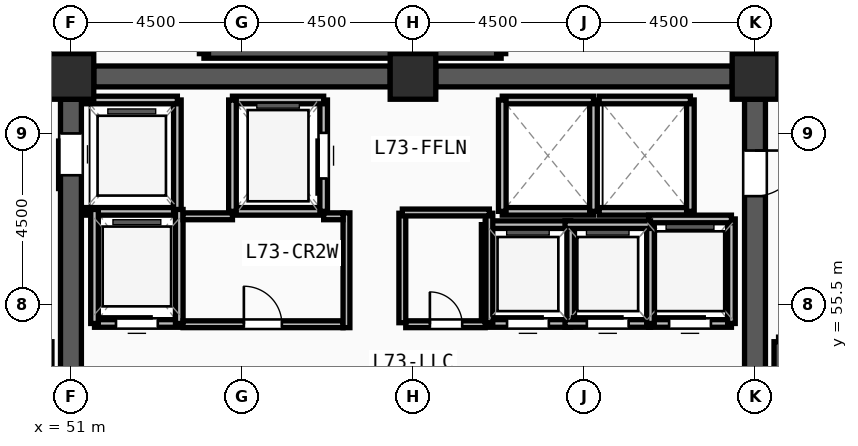
"""IFC4 building model, lengths in metres.
Left out: names, types, materials, properties, quantities, classifications, styles, units other than length and angle.
Written with IfcOpenShell. Run it as: python <this file> out.ifc"""

import sys

from ifc_helpers import new_model, si_unit, direction, frame, frame_2d, origin, origin_2d, place, context, subcontext, project, spatial, rectangle, extrude, source, transform, mapped, element, fill, save


model = new_model("IFC4")
c1 = context("Model", 3, precision=1e-05, world=origin(), true_north=direction((0.0, 1.0)))
c2 = subcontext(c1, "Body", "Model", "MODEL_VIEW")
j1 = project(units=[si_unit("LENGTHUNIT", "METRE"), si_unit("PLANEANGLEUNIT", "RADIAN")], contexts=[c1])
p1 = place(None, origin())
s1 = spatial("IfcSite", under=j1, at=p1, CompositionType="ELEMENT")
p2 = place(p1, origin())
s2 = spatial("IfcBuilding", under=s1, at=p2, CompositionType="ELEMENT")
p3 = place(p2, frame((0.0, 0.0, 282.0)))
s3 = spatial("IfcBuildingStorey", under=s2, at=p3, CompositionType="ELEMENT", Elevation=282.0)
m1 = source(origin(), c2, "Body", "SweptSolid", [
    extrude(rectangle(XDim=1.2, YDim=1.2, at=origin_2d()), origin(), (0.0, 0.0, 1.0), 4.5),
])
for number, where, z_axis, x_axis in (
    (1, (69.0, 61.5, 0.0), (0.0, 0.0, 1.0), (1.0, 0.0, 0.0)),
    (2, (60.0, 61.5, 0.0), (0.0, 0.0, 1.0), (1.0, 0.0, 0.0)),
    (3, (51.0, 61.5, 0.0), (0.0, 0.0, 1.0), (1.0, 0.0, 0.0)),
):
    element("IfcColumn", number, at=place(p3, frame(where, z_axis=z_axis, x_axis=x_axis)), inside=s3, PredefinedType="COLUMN", context=c2, shape_type="MappedRepresentation", body=[
        mapped(m1, transform((0.0, 0.0, 0.0), x_axis=(1.0, 0.0, 0.0), y_axis=(0.0, 1.0, 0.0), z_axis=(0.0, 0.0, 1.0), scale=1.0)),
    ])
for number, where, z_axis, x_axis in (
    (4, (51.6, 61.5, 0.0), (0.0, 0.0, 1.0), (1.0, 0.0, 0.0)),
    (5, (60.6, 61.5, 0.0), (0.0, 0.0, 1.0), (1.0, 0.0, 0.0)),
):
    element("IfcWall", number, at=place(p3, frame(where, z_axis=z_axis, x_axis=x_axis)), inside=s3, PredefinedType="SHEAR", context=c2, shape_type="SweptSolid", body=[
        extrude(rectangle(XDim=7.8, YDim=0.55, at=frame_2d((3.9, 0.0))), origin(), (0.0, 0.0, 1.0), 4.32),
    ])
p4 = place(p3, frame((69.0, 60.9, 0.0), z_axis=(0.0, 0.0, 1.0), x_axis=(0.0, -1.0, 0.0)))
e6 = element("IfcWall", 6, at=p4, inside=s3, PredefinedType="SHEAR", context=c2, shape_type="SweptSolid", body=[
    extrude(rectangle(XDim=13.8, YDim=0.55, at=frame_2d((6.9, 0.0))), origin(), (0.0, 0.0, 1.0), 4.32),
])
m2 = source(origin(), c2, "Body", "SweptSolid", [
    extrude(rectangle(XDim=1.2, YDim=2.2, at=frame_2d((0.6, 1.1))), frame((0.0, 0.285, 0.0), z_axis=(0.0, -1.0, 0.0), x_axis=(1.0, 0.0, 0.0)), (0.0, 0.0, 1.0), 0.57),
])
p5 = place(p4, frame((1.35, 0.0, 0.0)))
e7 = element("IfcOpeningElement", 7, at=p5, cuts=e6, PredefinedType="OPENING", context=c2, shape_type="MappedRepresentation", body=[
    mapped(m2, transform((0.0, 0.0, 0.0), x_axis=(1.0, 0.0, 0.0), y_axis=(0.0, 1.0, 0.0), z_axis=(0.0, 0.0, 1.0), scale=1.0)),
])
p6 = place(p3, frame((51.0, 47.1, 0.0), z_axis=(0.0, 0.0, 1.0), x_axis=(0.0, 1.0, 0.0)))
e8 = element("IfcWall", 8, at=p6, inside=s3, PredefinedType="SHEAR", context=c2, shape_type="SweptSolid", body=[
    extrude(rectangle(XDim=13.8, YDim=0.55, at=frame_2d((6.9, 0.0))), origin(), (0.0, 0.0, 1.0), 4.32),
])
m3 = source(origin(), c2, "Body", "SweptSolid", [
    extrude(rectangle(XDim=1.1, YDim=2.2, at=frame_2d((0.55, 1.1))), frame((0.0, 0.285, 0.0), z_axis=(0.0, -1.0, 0.0), x_axis=(1.0, 0.0, 0.0)), (0.0, 0.0, 1.0), 0.57),
])
p7 = place(p6, frame((11.8, 0.0, 0.0)))
e9 = element("IfcOpeningElement", 9, at=p7, cuts=e8, PredefinedType="OPENING", context=c2, shape_type="MappedRepresentation", body=[
    mapped(m3, transform((0.0, 0.0, 0.0), x_axis=(1.0, 0.0, 0.0), y_axis=(0.0, 1.0, 0.0), z_axis=(0.0, 0.0, 1.0), scale=1.0)),
])
for number, where, z_axis, x_axis in (
    (10, (69.62, 54.52, 0.0), (0.0, 0.0, 1.0), (0.0, -1.0, 0.0)),
    (11, (54.5, 62.1, 0.0), (0.0, 0.0, 1.0), (1.0, 0.0, 0.0)),
):
    element("IfcWall", number, at=place(p3, frame(where, z_axis=z_axis, x_axis=x_axis)), inside=s3, PredefinedType="SOLIDWALL", context=c2, shape_type="SweptSolid", body=[
        extrude(rectangle(XDim=7.82, YDim=0.24, at=frame_2d((3.91, 0.0))), origin(), (0.0, 0.0, 1.0), 4.32),
    ])
for number, where, z_axis, x_axis in (
    (12, (62.32, 62.1, 0.0), (0.0, 0.0, 1.0), (0.0, 1.0, 0.0)),
    (13, (54.5, 65.54, 0.0), (0.0, 0.0, 1.0), (0.0, -1.0, 0.0)),
):
    element("IfcWall", number, at=place(p3, frame(where, z_axis=z_axis, x_axis=x_axis)), inside=s3, PredefinedType="SOLIDWALL", context=c2, shape_type="SweptSolid", body=[
        extrude(rectangle(XDim=3.44, YDim=0.24, at=frame_2d((1.72, 0.0))), origin(), (0.0, 0.0, 1.0), 4.32),
    ])
p8 = place(p3, frame((55.25, 57.95, 0.0), z_axis=(0.0, 0.0, 1.0), x_axis=(1.0, 0.0, 0.0)))
e14 = element("IfcWall", 14, at=p8, inside=s3, PredefinedType="SOLIDWALL", context=c2, shape_type="SweptSolid", body=[
    extrude(rectangle(XDim=2.4, YDim=0.2, at=frame_2d((1.2, 0.0))), origin(), (0.0, 0.0, 1.0), 4.32),
])
p9 = place(p3, frame((57.65, 57.95, 0.0), z_axis=(0.0, 0.0, 1.0), x_axis=(0.0, 1.0, 0.0)))
e15 = element("IfcWall", 15, at=p9, inside=s3, PredefinedType="SOLIDWALL", context=c2, shape_type="SweptSolid", body=[
    extrude(rectangle(XDim=2.93, YDim=0.2, at=frame_2d((1.465, 0.0))), origin(), (0.0, 0.0, 1.0), 4.32),
])
m4 = source(origin(), c2, "Body", "SweptSolid", [
    extrude(rectangle(XDim=1.2, YDim=2.3, at=frame_2d((0.6, 1.15))), frame((0.0, 0.11, 0.0), z_axis=(0.0, -1.0, 0.0), x_axis=(1.0, 0.0, 0.0)), (0.0, 0.0, 1.0), 0.22),
])
p10 = place(p9, frame((0.865, 0.0, 0.0)))
e16 = element("IfcOpeningElement", 16, at=p10, cuts=e15, PredefinedType="OPENING", context=c2, shape_type="MappedRepresentation", body=[
    mapped(m4, transform((0.0, 0.0, 0.0), x_axis=(1.0, 0.0, 0.0), y_axis=(0.0, 1.0, 0.0), z_axis=(0.0, 0.0, 1.0), scale=1.0)),
])
p11 = place(p3, frame((57.65, 60.88, 0.0), z_axis=(0.0, 0.0, 1.0), x_axis=(-1.0, 0.0, 0.0)))
e17 = element("IfcWall", 17, at=p11, inside=s3, PredefinedType="SOLIDWALL", context=c2, shape_type="SweptSolid", body=[
    extrude(rectangle(XDim=2.4, YDim=0.2, at=frame_2d((1.2, 0.0))), origin(), (0.0, 0.0, 1.0), 4.32),
])
p12 = place(p3, frame((55.25, 60.88, 0.0), z_axis=(0.0, 0.0, 1.0), x_axis=(0.0, -1.0, 0.0)))
e18 = element("IfcWall", 18, at=p12, inside=s3, PredefinedType="SOLIDWALL", context=c2, shape_type="SweptSolid", body=[
    extrude(rectangle(XDim=2.93, YDim=0.2, at=frame_2d((1.465, 0.0))), origin(), (0.0, 0.0, 1.0), 4.32),
])
p13 = place(p3, frame((62.35, 57.95, 0.0), z_axis=(0.0, 0.0, 1.0), x_axis=(1.0, 0.0, 0.0)))
e19 = element("IfcWall", 19, at=p13, inside=s3, PredefinedType="SOLIDWALL", context=c2, shape_type="SweptSolid", body=[
    extrude(rectangle(XDim=2.4, YDim=0.2, at=frame_2d((1.2, 0.0))), origin(), (0.0, 0.0, 1.0), 4.32),
])
p14 = place(p3, frame((64.75, 57.95, 0.0), z_axis=(0.0, 0.0, 1.0), x_axis=(0.0, 1.0, 0.0)))
e20 = element("IfcWall", 20, at=p14, inside=s3, PredefinedType="SOLIDWALL", context=c2, shape_type="SweptSolid", body=[
    extrude(rectangle(XDim=2.93, YDim=0.2, at=frame_2d((1.465, 0.0))), origin(), (0.0, 0.0, 1.0), 4.32),
])
p15 = place(p3, frame((64.75, 60.88, 0.0), z_axis=(0.0, 0.0, 1.0), x_axis=(-1.0, 0.0, 0.0)))
e21 = element("IfcWall", 21, at=p15, inside=s3, PredefinedType="SOLIDWALL", context=c2, shape_type="SweptSolid", body=[
    extrude(rectangle(XDim=2.4, YDim=0.2, at=frame_2d((1.2, 0.0))), origin(), (0.0, 0.0, 1.0), 4.32),
])
p16 = place(p3, frame((62.35, 60.88, 0.0), z_axis=(0.0, 0.0, 1.0), x_axis=(0.0, -1.0, 0.0)))
e22 = element("IfcWall", 22, at=p16, inside=s3, PredefinedType="SOLIDWALL", context=c2, shape_type="SweptSolid", body=[
    extrude(rectangle(XDim=2.93, YDim=0.2, at=frame_2d((1.465, 0.0))), origin(), (0.0, 0.0, 1.0), 4.32),
])
p17 = place(p3, frame((64.9, 57.95, 0.0), z_axis=(0.0, 0.0, 1.0), x_axis=(1.0, 0.0, 0.0)))
e23 = element("IfcWall", 23, at=p17, inside=s3, PredefinedType="SOLIDWALL", context=c2, shape_type="SweptSolid", body=[
    extrude(rectangle(XDim=2.4, YDim=0.2, at=frame_2d((1.2, 0.0))), origin(), (0.0, 0.0, 1.0), 4.32),
])
p18 = place(p3, frame((67.3, 57.95, 0.0), z_axis=(0.0, 0.0, 1.0), x_axis=(0.0, 1.0, 0.0)))
e24 = element("IfcWall", 24, at=p18, inside=s3, PredefinedType="SOLIDWALL", context=c2, shape_type="SweptSolid", body=[
    extrude(rectangle(XDim=2.93, YDim=0.2, at=frame_2d((1.465, 0.0))), origin(), (0.0, 0.0, 1.0), 4.32),
])
for number, where, z_axis, x_axis in (
    (25, (67.3, 60.88, 0.0), (0.0, 0.0, 1.0), (-1.0, 0.0, 0.0)),
    (26, (51.4, 57.95, 0.0), (0.0, 0.0, 1.0), (1.0, 0.0, 0.0)),
):
    element("IfcWall", number, at=place(p3, frame(where, z_axis=z_axis, x_axis=x_axis)), inside=s3, PredefinedType="SOLIDWALL", context=c2, shape_type="SweptSolid", body=[
        extrude(rectangle(XDim=2.4, YDim=0.2, at=frame_2d((1.2, 0.0))), origin(), (0.0, 0.0, 1.0), 4.32),
    ])
p19 = place(p3, frame((53.8, 57.95, 0.0), z_axis=(0.0, 0.0, 1.0), x_axis=(0.0, 1.0, 0.0)))
e27 = element("IfcWall", 27, at=p19, inside=s3, PredefinedType="SOLIDWALL", context=c2, shape_type="SweptSolid", body=[
    extrude(rectangle(XDim=2.93, YDim=0.2, at=frame_2d((1.465, 0.0))), origin(), (0.0, 0.0, 1.0), 4.32),
])
p20 = place(p3, frame((53.8, 60.88, 0.0), z_axis=(0.0, 0.0, 1.0), x_axis=(-1.0, 0.0, 0.0)))
e28 = element("IfcWall", 28, at=p20, inside=s3, PredefinedType="SOLIDWALL", context=c2, shape_type="SweptSolid", body=[
    extrude(rectangle(XDim=2.4, YDim=0.2, at=frame_2d((1.2, 0.0))), origin(), (0.0, 0.0, 1.0), 4.32),
])
p21 = place(p3, frame((51.62, 55.0, 0.0), z_axis=(0.0, 0.0, 1.0), x_axis=(1.0, 0.0, 0.0)))
e29 = element("IfcWall", 29, at=p21, inside=s3, PredefinedType="SOLIDWALL", context=c2, shape_type="SweptSolid", body=[
    extrude(rectangle(XDim=2.23, YDim=0.2, at=frame_2d((1.115, 0.0))), origin(), (0.0, 0.0, 1.0), 4.32),
])
m5 = source(origin(), c2, "Body", "SweptSolid", [
    extrude(rectangle(XDim=1.1, YDim=2.2, at=frame_2d((0.55, 1.1))), frame((0.0, 0.11, 0.0), z_axis=(0.0, -1.0, 0.0), x_axis=(1.0, 0.0, 0.0)), (0.0, 0.0, 1.0), 0.22),
])
p22 = place(p21, frame((0.565, 0.0, 0.0)))
e30 = element("IfcOpeningElement", 30, at=p22, cuts=e29, PredefinedType="OPENING", context=c2, shape_type="MappedRepresentation", body=[
    mapped(m5, transform((0.0, 0.0, 0.0), x_axis=(1.0, 0.0, 0.0), y_axis=(0.0, 1.0, 0.0), z_axis=(0.0, 0.0, 1.0), scale=1.0)),
])
for number, where, z_axis, x_axis in (
    (31, (53.85, 55.0, 0.0), (0.0, 0.0, 1.0), (0.0, 1.0, 0.0)),
    (32, (51.62, 58.0, 0.0), (0.0, 0.0, 1.0), (0.0, -1.0, 0.0)),
):
    element("IfcWall", number, at=place(p3, frame(where, z_axis=z_axis, x_axis=x_axis)), inside=s3, PredefinedType="SOLIDWALL", context=c2, shape_type="SweptSolid", body=[
        extrude(rectangle(XDim=3.0, YDim=0.2, at=frame_2d((1.5, 0.0))), origin(), (0.0, 0.0, 1.0), 4.32),
    ])
p23 = place(p3, frame((66.2, 55.0, 0.0), z_axis=(0.0, 0.0, 1.0), x_axis=(1.0, 0.0, 0.0)))
e33 = element("IfcWall", 33, at=p23, inside=s3, PredefinedType="SOLIDWALL", context=c2, shape_type="SweptSolid", body=[
    extrude(rectangle(XDim=2.18, YDim=0.2, at=frame_2d((1.09, 0.0))), origin(), (0.0, 0.0, 1.0), 4.32),
])
p24 = place(p23, frame((0.54, 0.0, 0.0)))
e34 = element("IfcOpeningElement", 34, at=p24, cuts=e33, PredefinedType="OPENING", context=c2, shape_type="MappedRepresentation", body=[
    mapped(m5, transform((0.0, 0.0, 0.0), x_axis=(1.0, 0.0, 0.0), y_axis=(0.0, 1.0, 0.0), z_axis=(0.0, 0.0, 1.0), scale=1.0)),
])
p25 = place(p3, frame((68.38, 55.0, 0.0), z_axis=(0.0, 0.0, 1.0), x_axis=(0.0, 1.0, 0.0)))
e35 = element("IfcWall", 35, at=p25, inside=s3, PredefinedType="SOLIDWALL", context=c2, shape_type="SweptSolid", body=[
    extrude(rectangle(XDim=2.75, YDim=0.2, at=frame_2d((1.375, 0.0))), origin(), (0.0, 0.0, 1.0), 4.32),
])
p26 = place(p3, frame((68.38, 57.75, 0.0), z_axis=(0.0, 0.0, 1.0), x_axis=(-1.0, 0.0, 0.0)))
e36 = element("IfcWall", 36, at=p26, inside=s3, PredefinedType="SOLIDWALL", context=c2, shape_type="SweptSolid", body=[
    extrude(rectangle(XDim=2.18, YDim=0.2, at=frame_2d((1.09, 0.0))), origin(), (0.0, 0.0, 1.0), 4.32),
])
p27 = place(p3, frame((61.9, 55.0, 0.0), z_axis=(0.0, 0.0, 1.0), x_axis=(1.0, 0.0, 0.0)))
e37 = element("IfcWall", 37, at=p27, inside=s3, PredefinedType="SOLIDWALL", context=c2, shape_type="SweptSolid", body=[
    extrude(rectangle(XDim=2.25, YDim=0.2, at=frame_2d((1.125, 0.0))), origin(), (0.0, 0.0, 1.0), 4.32),
])
p28 = place(p27, frame((0.575, 0.0, 0.0)))
e38 = element("IfcOpeningElement", 38, at=p28, cuts=e37, PredefinedType="OPENING", context=c2, shape_type="MappedRepresentation", body=[
    mapped(m5, transform((0.0, 0.0, 0.0), x_axis=(1.0, 0.0, 0.0), y_axis=(0.0, 1.0, 0.0), z_axis=(0.0, 0.0, 1.0), scale=1.0)),
])
p29 = place(p3, frame((64.15, 55.0, 0.0), z_axis=(0.0, 0.0, 1.0), x_axis=(0.0, 1.0, 0.0)))
e39 = element("IfcWall", 39, at=p29, inside=s3, PredefinedType="SOLIDWALL", context=c2, shape_type="SweptSolid", body=[
    extrude(rectangle(XDim=2.6, YDim=0.2, at=frame_2d((1.3, 0.0))), origin(), (0.0, 0.0, 1.0), 4.32),
])
p30 = place(p3, frame((64.15, 57.6, 0.0), z_axis=(0.0, 0.0, 1.0), x_axis=(-1.0, 0.0, 0.0)))
e40 = element("IfcWall", 40, at=p30, inside=s3, PredefinedType="SOLIDWALL", context=c2, shape_type="SweptSolid", body=[
    extrude(rectangle(XDim=2.25, YDim=0.2, at=frame_2d((1.125, 0.0))), origin(), (0.0, 0.0, 1.0), 4.32),
])
p31 = place(p3, frame((61.9, 57.6, 0.0), z_axis=(0.0, 0.0, 1.0), x_axis=(0.0, -1.0, 0.0)))
e41 = element("IfcWall", 41, at=p31, inside=s3, PredefinedType="SOLIDWALL", context=c2, shape_type="SweptSolid", body=[
    extrude(rectangle(XDim=2.6, YDim=0.2, at=frame_2d((1.3, 0.0))), origin(), (0.0, 0.0, 1.0), 4.32),
])
p32 = place(p3, frame((64.0, 55.0, 0.0), z_axis=(0.0, 0.0, 1.0), x_axis=(1.0, 0.0, 0.0)))
e42 = element("IfcWall", 42, at=p32, inside=s3, PredefinedType="SOLIDWALL", context=c2, shape_type="SweptSolid", body=[
    extrude(rectangle(XDim=2.25, YDim=0.2, at=frame_2d((1.125, 0.0))), origin(), (0.0, 0.0, 1.0), 4.32),
])
p33 = place(p32, frame((0.575, 0.0, 0.0)))
e43 = element("IfcOpeningElement", 43, at=p33, cuts=e42, PredefinedType="OPENING", context=c2, shape_type="MappedRepresentation", body=[
    mapped(m5, transform((0.0, 0.0, 0.0), x_axis=(1.0, 0.0, 0.0), y_axis=(0.0, 1.0, 0.0), z_axis=(0.0, 0.0, 1.0), scale=1.0)),
])
p34 = place(p3, frame((66.25, 55.0, 0.0), z_axis=(0.0, 0.0, 1.0), x_axis=(0.0, 1.0, 0.0)))
e44 = element("IfcWall", 44, at=p34, inside=s3, PredefinedType="SOLIDWALL", context=c2, shape_type="SweptSolid", body=[
    extrude(rectangle(XDim=2.6, YDim=0.2, at=frame_2d((1.3, 0.0))), origin(), (0.0, 0.0, 1.0), 4.32),
])
p35 = place(p3, frame((66.25, 57.6, 0.0), z_axis=(0.0, 0.0, 1.0), x_axis=(-1.0, 0.0, 0.0)))
e45 = element("IfcWall", 45, at=p35, inside=s3, PredefinedType="SOLIDWALL", context=c2, shape_type="SweptSolid", body=[
    extrude(rectangle(XDim=2.25, YDim=0.2, at=frame_2d((1.125, 0.0))), origin(), (0.0, 0.0, 1.0), 4.32),
])
p36 = place(p3, frame((53.95, 54.98, 0.0), z_axis=(0.0, 0.0, 1.0), x_axis=(1.0, 0.0, 0.0)))
e46 = element("IfcWall", 46, at=p36, inside=s3, PredefinedType="PARTITIONING", context=c2, shape_type="SweptSolid", body=[
    extrude(rectangle(XDim=4.21, YDim=0.18, at=frame_2d((2.105, 0.0))), origin(), (0.0, 0.0, 1.0), 4.32),
])
m6 = source(origin(), c2, "Body", "SweptSolid", [
    extrude(rectangle(XDim=1.0, YDim=2.2, at=frame_2d((0.5, 1.1))), frame((0.0, 0.1, 0.0), z_axis=(0.0, -1.0, 0.0), x_axis=(1.0, 0.0, 0.0)), (0.0, 0.0, 1.0), 0.2),
])
p37 = place(p36, frame((1.6, 0.0, 0.0)))
e47 = element("IfcOpeningElement", 47, at=p37, cuts=e46, PredefinedType="OPENING", context=c2, shape_type="MappedRepresentation", body=[
    mapped(m6, transform((0.0, 0.0, 0.0), x_axis=(1.0, 0.0, 0.0), y_axis=(0.0, 1.0, 0.0), z_axis=(0.0, 0.0, 1.0), scale=1.0)),
])
p38 = place(p3, frame((59.81, 54.98, 0.0), z_axis=(0.0, 0.0, 1.0), x_axis=(1.0, 0.0, 0.0)))
e48 = element("IfcWall", 48, at=p38, inside=s3, PredefinedType="PARTITIONING", context=c2, shape_type="SweptSolid", body=[
    extrude(rectangle(XDim=2.09, YDim=0.18, at=frame_2d((1.045, 0.0))), origin(), (0.0, 0.0, 1.0), 4.32),
])
m7 = source(origin(), c2, "Body", "SweptSolid", [
    extrude(rectangle(XDim=0.85, YDim=2.1, at=frame_2d((0.425, 1.05))), frame((0.0, 0.1, 0.0), z_axis=(0.0, -1.0, 0.0), x_axis=(1.0, 0.0, 0.0)), (0.0, 0.0, 1.0), 0.2),
])
p39 = place(p38, frame((0.635, 0.0, 0.0)))
e49 = element("IfcOpeningElement", 49, at=p39, cuts=e48, PredefinedType="OPENING", context=c2, shape_type="MappedRepresentation", body=[
    mapped(m7, transform((0.0, 0.0, 0.0), x_axis=(1.0, 0.0, 0.0), y_axis=(0.0, 1.0, 0.0), z_axis=(0.0, 0.0, 1.0), scale=1.0)),
])
for number, where, z_axis, x_axis in (
    (50, (59.72, 55.02, 0.0), (0.0, 0.0, 1.0), (0.0, 1.0, 0.0)),
    (51, (62.01, 55.02, 0.0), (0.0, 0.0, 1.0), (0.0, 1.0, 0.0)),
):
    element("IfcWall", number, at=place(p3, frame(where, z_axis=z_axis, x_axis=x_axis)), inside=s3, PredefinedType="PARTITIONING", context=c2, shape_type="SweptSolid", body=[
        extrude(rectangle(XDim=2.88, YDim=0.18, at=frame_2d((1.44, 0.0))), origin(), (0.0, 0.0, 1.0), 4.32),
    ])
p40 = place(p3, frame((59.72, 57.92, 0.0), z_axis=(0.0, 0.0, 1.0), x_axis=(1.0, 0.0, 0.0)))
e52 = element("IfcWall", 52, at=p40, inside=s3, PredefinedType="PARTITIONING", context=c2, shape_type="SweptSolid", body=[
    extrude(rectangle(XDim=2.29, YDim=0.18, at=frame_2d((1.145, 0.0))), origin(), (0.0, 0.0, 1.0), 4.32),
])
for number, where, z_axis, x_axis in (
    (53, (50.54, 61.95, 0.0), (0.0, 0.0, 1.0), (0.0, 1.0, 0.0)),
    (54, (69.46, 61.95, 0.0), (0.0, 0.0, 1.0), (0.0, 1.0, 0.0)),
):
    element("IfcWall", number, at=place(p3, frame(where, z_axis=z_axis, x_axis=x_axis)), inside=s3, PredefinedType="PARTITIONING", context=c2, shape_type="SweptSolid", body=[
        extrude(rectangle(XDim=3.63, YDim=0.18, at=frame_2d((1.815, 0.0))), origin(), (0.0, 0.0, 1.0), 4.32),
    ])
p41 = place(p3, frame((58.25, 54.89, 0.0), z_axis=(0.0, 0.0, 1.0), x_axis=(0.0, 1.0, 0.0)))
e55 = element("IfcWall", 55, at=p41, inside=s3, PredefinedType="PARTITIONING", context=c2, shape_type="SweptSolid", body=[
    extrude(rectangle(XDim=3.02, YDim=0.18, at=frame_2d((1.51, 0.0))), origin(), (0.0, 0.0, 1.0), 4.32),
])
p42 = place(p3, frame((53.95, 57.82, 0.0), z_axis=(0.0, 0.0, 1.0), x_axis=(1.0, 0.0, 0.0)))
e56 = element("IfcWall", 56, at=p42, inside=s3, PredefinedType="PARTITIONING", context=c2, shape_type="SweptSolid", body=[
    extrude(rectangle(XDim=1.3, YDim=0.18, at=frame_2d((0.65, 0.0))), origin(), (0.0, 0.0, 1.0), 4.32),
])
p43 = place(p3, frame((57.65, 57.82, 0.0), z_axis=(0.0, 0.0, 1.0), x_axis=(1.0, 0.0, 0.0)))
e57 = element("IfcWall", 57, at=p43, inside=s3, PredefinedType="PARTITIONING", context=c2, shape_type="SweptSolid", body=[
    extrude(rectangle(XDim=0.51, YDim=0.18, at=frame_2d((0.255, 0.0))), origin(), (0.0, 0.0, 1.0), 4.32),
])
m8 = source(origin(), c2, "Body", "SweptSolid", [
    extrude(rectangle(XDim=1.2, YDim=2.2, at=frame_2d((0.6, 1.1))), frame((0.0, 0.025, 0.0), z_axis=(0.0, -1.0, 0.0), x_axis=(1.0, 0.0, 0.0)), (0.0, 0.0, 1.0), 0.05),
])
p44 = place(p5, origin())
e58 = element("IfcDoor", 58, at=p44, inside=s3, OperationType="SINGLE_SWING_LEFT", PredefinedType="DOOR", context=c2, shape_type="MappedRepresentation", body=[
    mapped(m8, transform((0.0, 0.0, 0.0), x_axis=(1.0, 0.0, 0.0), y_axis=(0.0, 1.0, 0.0), z_axis=(0.0, 0.0, 1.0), scale=1.0)),
])
fill(e7, e58)
m9 = source(origin(), c2, "Body", "SweptSolid", [
    extrude(rectangle(XDim=1.2, YDim=2.3, at=frame_2d((0.6, 1.15))), frame((0.0, 0.025, 0.0), z_axis=(0.0, -1.0, 0.0), x_axis=(1.0, 0.0, 0.0)), (0.0, 0.0, 1.0), 0.05),
])
p45 = place(p10, origin())
e59 = element("IfcDoor", 59, at=p45, inside=s3, OperationType="SLIDING_TO_LEFT", PredefinedType="DOOR", context=c2, shape_type="MappedRepresentation", body=[
    mapped(m9, transform((0.0, 0.0, 0.0), x_axis=(1.0, 0.0, 0.0), y_axis=(0.0, 1.0, 0.0), z_axis=(0.0, 0.0, 1.0), scale=1.0)),
])
fill(e16, e59)
m10 = source(origin(), c2, "Body", "SweptSolid", [
    extrude(rectangle(XDim=1.1, YDim=2.2, at=frame_2d((0.55, 1.1))), frame((0.0, 0.025, 0.0), z_axis=(0.0, -1.0, 0.0), x_axis=(1.0, 0.0, 0.0)), (0.0, 0.0, 1.0), 0.05),
])
p46 = place(p7, origin())
e60 = element("IfcDoor", 60, at=p46, inside=s3, OperationType="SLIDING_TO_LEFT", PredefinedType="DOOR", context=c2, shape_type="MappedRepresentation", body=[
    mapped(m10, transform((0.0, 0.0, 0.0), x_axis=(1.0, 0.0, 0.0), y_axis=(0.0, 1.0, 0.0), z_axis=(0.0, 0.0, 1.0), scale=1.0)),
])
fill(e9, e60)
p47 = place(p22, origin())
e61 = element("IfcDoor", 61, at=p47, inside=s3, OperationType="SLIDING_TO_LEFT", PredefinedType="DOOR", context=c2, shape_type="MappedRepresentation", body=[
    mapped(m10, transform((0.0, 0.0, 0.0), x_axis=(1.0, 0.0, 0.0), y_axis=(0.0, 1.0, 0.0), z_axis=(0.0, 0.0, 1.0), scale=1.0)),
])
fill(e30, e61)
p48 = place(p24, origin())
e62 = element("IfcDoor", 62, at=p48, inside=s3, OperationType="SLIDING_TO_LEFT", PredefinedType="DOOR", context=c2, shape_type="MappedRepresentation", body=[
    mapped(m10, transform((0.0, 0.0, 0.0), x_axis=(1.0, 0.0, 0.0), y_axis=(0.0, 1.0, 0.0), z_axis=(0.0, 0.0, 1.0), scale=1.0)),
])
fill(e34, e62)
p49 = place(p28, origin())
e63 = element("IfcDoor", 63, at=p49, inside=s3, OperationType="SLIDING_TO_LEFT", PredefinedType="DOOR", context=c2, shape_type="MappedRepresentation", body=[
    mapped(m10, transform((0.0, 0.0, 0.0), x_axis=(1.0, 0.0, 0.0), y_axis=(0.0, 1.0, 0.0), z_axis=(0.0, 0.0, 1.0), scale=1.0)),
])
fill(e38, e63)
p50 = place(p33, origin())
e64 = element("IfcDoor", 64, at=p50, inside=s3, OperationType="SLIDING_TO_LEFT", PredefinedType="DOOR", context=c2, shape_type="MappedRepresentation", body=[
    mapped(m10, transform((0.0, 0.0, 0.0), x_axis=(1.0, 0.0, 0.0), y_axis=(0.0, 1.0, 0.0), z_axis=(0.0, 0.0, 1.0), scale=1.0)),
])
fill(e43, e64)
m11 = source(origin(), c2, "Body", "SweptSolid", [
    extrude(rectangle(XDim=1.0, YDim=2.2, at=frame_2d((0.5, 1.1))), frame((0.0, 0.025, 0.0), z_axis=(0.0, -1.0, 0.0), x_axis=(1.0, 0.0, 0.0)), (0.0, 0.0, 1.0), 0.05),
])
p51 = place(p37, origin())
e65 = element("IfcDoor", 65, at=p51, inside=s3, OperationType="SINGLE_SWING_LEFT", PredefinedType="DOOR", context=c2, shape_type="MappedRepresentation", body=[
    mapped(m11, transform((0.0, 0.0, 0.0), x_axis=(1.0, 0.0, 0.0), y_axis=(0.0, 1.0, 0.0), z_axis=(0.0, 0.0, 1.0), scale=1.0)),
])
fill(e47, e65)
m12 = source(origin(), c2, "Body", "SweptSolid", [
    extrude(rectangle(XDim=0.85, YDim=2.1, at=frame_2d((0.425, 1.05))), frame((0.0, 0.025, 0.0), z_axis=(0.0, -1.0, 0.0), x_axis=(1.0, 0.0, 0.0)), (0.0, 0.0, 1.0), 0.05),
])
p52 = place(p39, origin())
e66 = element("IfcDoor", 66, at=p52, inside=s3, OperationType="SINGLE_SWING_LEFT", PredefinedType="DOOR", context=c2, shape_type="MappedRepresentation", body=[
    mapped(m12, transform((0.0, 0.0, 0.0), x_axis=(1.0, 0.0, 0.0), y_axis=(0.0, 1.0, 0.0), z_axis=(0.0, 0.0, 1.0), scale=1.0)),
])
fill(e49, e66)
save(model, sys.argv[1])
